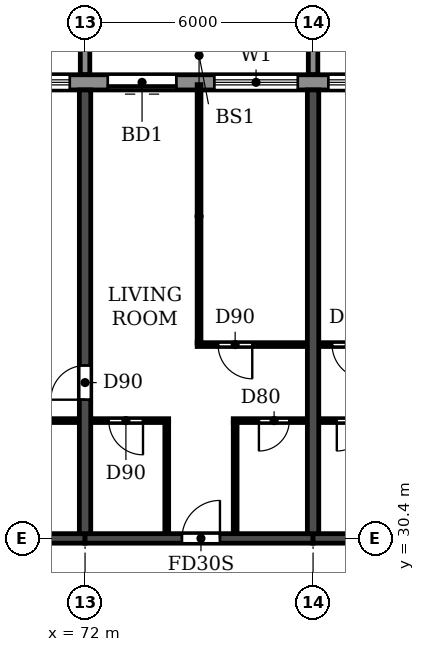
"""IFC4 building model, lengths in metres.
Left out: names, types, materials, properties, quantities, classifications, styles, units other than length and angle.
Written with IfcOpenShell. Run it as: python <this file> out.ifc"""

import sys

from ifc_helpers import new_model, si_unit, direction, frame, frame_2d, origin, place, context, subcontext, project, spatial, polyline, rectangle, outline, extrude, source, transform, mapped, element, fill, save


model = new_model("IFC4")
c1 = context("Model", 3, precision=1e-05, world=origin(), true_north=direction((0.0, 1.0)))
c2 = subcontext(c1, "Body", "Model", "MODEL_VIEW")
j1 = project(units=[si_unit("LENGTHUNIT", "METRE"), si_unit("PLANEANGLEUNIT", "RADIAN")], contexts=[c1])
p1 = place(None, origin())
s1 = spatial("IfcSite", under=j1, at=p1, CompositionType="ELEMENT")
p2 = place(p1, origin())
s2 = spatial("IfcBuilding", under=s1, at=p2, CompositionType="ELEMENT")
p3 = place(p2, frame((0.0, 0.0, 155.4)))
s3 = spatial("IfcBuildingStorey", under=s2, at=p3, CompositionType="ELEMENT", Elevation=155.4)
p4 = place(p3, frame((72.0, 30.525, 0.0), z_axis=(0.0, 0.0, 1.0), x_axis=(0.0, 1.0, 0.0)))
e1 = element("IfcWall", 1, at=p4, inside=s3, PredefinedType="SHEAR", context=c2, shape_type="SweptSolid", body=[
    extrude(rectangle(XDim=11.675, YDim=0.3, at=frame_2d((5.837, 0.0))), origin(), (0.0, 0.0, 1.0), 3.0),
])
p5 = place(p4, frame((3.525, 0.0, 0.0)))
e2 = element("IfcOpeningElement", 2, at=p5, cuts=e1, PredefinedType="OPENING", context=c2, shape_type="SweptSolid", body=[
    extrude(rectangle(XDim=0.9, YDim=2.1, at=frame_2d((0.45, 1.05))), frame((0.0, 0.16, 0.0), z_axis=(0.0, -1.0, 0.0), x_axis=(1.0, 0.0, 0.0)), (0.0, 0.0, 1.0), 0.32),
])
p6 = place(p3, frame((78.0, 30.525, 0.0), z_axis=(0.0, 0.0, 1.0), x_axis=(0.0, 1.0, 0.0)))
e3 = element("IfcWall", 3, at=p6, inside=s3, PredefinedType="SHEAR", context=c2, shape_type="SweptSolid", body=[
    extrude(rectangle(XDim=11.675, YDim=0.3, at=frame_2d((5.837, 0.0))), origin(), (0.0, 0.0, 1.0), 3.0),
])
p7 = place(p3, frame((66.0, 30.4, 0.0), z_axis=(0.0, 0.0, 1.0), x_axis=(1.0, 0.0, 0.0)))
e4 = element("IfcWall", 4, at=p7, inside=s3, PredefinedType="SHEAR", context=c2, shape_type="SweptSolid", body=[
    extrude(rectangle(XDim=6.0, YDim=0.25, at=frame_2d((3.0, 0.0))), origin(), (0.0, 0.0, 1.0), 2.4),
])
p8 = place(p3, frame((72.0, 30.4, 0.0), z_axis=(0.0, 0.0, 1.0), x_axis=(1.0, 0.0, 0.0)))
e5 = element("IfcWall", 5, at=p8, inside=s3, PredefinedType="SHEAR", context=c2, shape_type="SweptSolid", body=[
    extrude(rectangle(XDim=6.0, YDim=0.25, at=frame_2d((3.0, 0.0))), origin(), (0.0, 0.0, 1.0), 2.4),
])
p9 = place(p8, frame((2.55, 0.0, 0.0)))
e6 = element("IfcOpeningElement", 6, at=p9, cuts=e5, PredefinedType="OPENING", context=c2, shape_type="SweptSolid", body=[
    extrude(rectangle(XDim=1.0, YDim=2.1, at=frame_2d((0.5, 1.05))), frame((0.0, 0.135, 0.0), z_axis=(0.0, -1.0, 0.0), x_axis=(1.0, 0.0, 0.0)), (0.0, 0.0, 1.0), 0.27),
])
p10 = place(p3, frame((78.0, 30.4, 0.0), z_axis=(0.0, 0.0, 1.0), x_axis=(1.0, 0.0, 0.0)))
e7 = element("IfcWall", 7, at=p10, inside=s3, PredefinedType="SHEAR", context=c2, shape_type="SweptSolid", body=[
    extrude(rectangle(XDim=6.0, YDim=0.25, at=frame_2d((3.0, 0.0))), origin(), (0.0, 0.0, 1.0), 2.4),
])
p11 = place(p10, frame((2.45, 0.0, 0.0)))
e8 = element("IfcOpeningElement", 8, at=p11, cuts=e7, PredefinedType="OPENING", context=c2, shape_type="SweptSolid", body=[
    extrude(rectangle(XDim=1.0, YDim=2.1, at=frame_2d((0.5, 1.05))), frame((0.0, 0.135, 0.0), z_axis=(0.0, -1.0, 0.0), x_axis=(1.0, 0.0, 0.0)), (0.0, 0.0, 1.0), 0.27),
])
p12 = place(p3, frame((85.317, 42.4, 0.0), z_axis=(0.0, 0.0, 1.0), x_axis=(-1.0, 0.0, 0.0)))
e9 = element("IfcWall", 9, at=p12, inside=s3, PredefinedType="STANDARD", context=c2, shape_type="SweptSolid", body=[
    extrude(rectangle(XDim=68.634, YDim=0.4, at=frame_2d((34.317, 0.0))), origin(), (0.0, 0.0, 1.0), 3.0),
])
p13 = place(p12, frame((64.917, 0.0, 0.0)))
e10 = element("IfcOpeningElement", 10, at=p13, cuts=e9, PredefinedType="OPENING", context=c2, shape_type="SweptSolid", body=[
    extrude(rectangle(XDim=1.8, YDim=2.4, at=frame_2d((0.9, 1.2))), frame((0.0, 0.21, 0.0), z_axis=(0.0, -1.0, 0.0), x_axis=(1.0, 0.0, 0.0)), (0.0, 0.0, 1.0), 0.42),
])
p14 = place(p12, frame((61.717, 0.0, 0.9)))
e11 = element("IfcOpeningElement", 11, at=p14, cuts=e9, PredefinedType="OPENING", context=c2, shape_type="SweptSolid", body=[
    extrude(rectangle(XDim=2.2, YDim=1.5, at=frame_2d((1.1, 0.75))), frame((0.0, 0.21, 0.0), z_axis=(0.0, -1.0, 0.0), x_axis=(1.0, 0.0, 0.0)), (0.0, 0.0, 1.0), 0.42),
])
p15 = place(p12, frame((58.717, 0.0, 0.9)))
e12 = element("IfcOpeningElement", 12, at=p15, cuts=e9, PredefinedType="OPENING", context=c2, shape_type="SweptSolid", body=[
    extrude(rectangle(XDim=2.2, YDim=1.5, at=frame_2d((1.1, 0.75))), frame((0.0, 0.21, 0.0), z_axis=(0.0, -1.0, 0.0), x_axis=(1.0, 0.0, 0.0)), (0.0, 0.0, 1.0), 0.42),
])
p16 = place(p12, frame((55.917, 0.0, 0.0)))
e13 = element("IfcOpeningElement", 13, at=p16, cuts=e9, PredefinedType="OPENING", context=c2, shape_type="SweptSolid", body=[
    extrude(rectangle(XDim=1.8, YDim=2.4, at=frame_2d((0.9, 1.2))), frame((0.0, 0.21, 0.0), z_axis=(0.0, -1.0, 0.0), x_axis=(1.0, 0.0, 0.0)), (0.0, 0.0, 1.0), 0.42),
])
p17 = place(p12, frame((52.917, 0.0, 0.0)))
e14 = element("IfcOpeningElement", 14, at=p17, cuts=e9, PredefinedType="OPENING", context=c2, shape_type="SweptSolid", body=[
    extrude(rectangle(XDim=1.8, YDim=2.4, at=frame_2d((0.9, 1.2))), frame((0.0, 0.21, 0.0), z_axis=(0.0, -1.0, 0.0), x_axis=(1.0, 0.0, 0.0)), (0.0, 0.0, 1.0), 0.42),
])
p18 = place(p12, frame((49.717, 0.0, 0.9)))
e15 = element("IfcOpeningElement", 15, at=p18, cuts=e9, PredefinedType="OPENING", context=c2, shape_type="SweptSolid", body=[
    extrude(rectangle(XDim=2.2, YDim=1.5, at=frame_2d((1.1, 0.75))), frame((0.0, 0.21, 0.0), z_axis=(0.0, -1.0, 0.0), x_axis=(1.0, 0.0, 0.0)), (0.0, 0.0, 1.0), 0.42),
])
p19 = place(p12, frame((46.717, 0.0, 0.9)))
e16 = element("IfcOpeningElement", 16, at=p19, cuts=e9, PredefinedType="OPENING", context=c2, shape_type="SweptSolid", body=[
    extrude(rectangle(XDim=2.2, YDim=1.5, at=frame_2d((1.1, 0.75))), frame((0.0, 0.21, 0.0), z_axis=(0.0, -1.0, 0.0), x_axis=(1.0, 0.0, 0.0)), (0.0, 0.0, 1.0), 0.42),
])
p20 = place(p12, frame((43.717, 0.0, 0.9)))
e17 = element("IfcOpeningElement", 17, at=p20, cuts=e9, PredefinedType="OPENING", context=c2, shape_type="SweptSolid", body=[
    extrude(rectangle(XDim=2.2, YDim=1.5, at=frame_2d((1.1, 0.75))), frame((0.0, 0.21, 0.0), z_axis=(0.0, -1.0, 0.0), x_axis=(1.0, 0.0, 0.0)), (0.0, 0.0, 1.0), 0.42),
])
p21 = place(p12, frame((40.917, 0.0, 0.0)))
e18 = element("IfcOpeningElement", 18, at=p21, cuts=e9, PredefinedType="OPENING", context=c2, shape_type="SweptSolid", body=[
    extrude(rectangle(XDim=1.8, YDim=2.4, at=frame_2d((0.9, 1.2))), frame((0.0, 0.21, 0.0), z_axis=(0.0, -1.0, 0.0), x_axis=(1.0, 0.0, 0.0)), (0.0, 0.0, 1.0), 0.42),
])
p22 = place(p12, frame((37.717, 0.0, 0.9)))
e19 = element("IfcOpeningElement", 19, at=p22, cuts=e9, PredefinedType="OPENING", context=c2, shape_type="SweptSolid", body=[
    extrude(rectangle(XDim=2.2, YDim=1.5, at=frame_2d((1.1, 0.75))), frame((0.0, 0.21, 0.0), z_axis=(0.0, -1.0, 0.0), x_axis=(1.0, 0.0, 0.0)), (0.0, 0.0, 1.0), 0.42),
])
p23 = place(p12, frame((34.917, 0.0, 0.0)))
e20 = element("IfcOpeningElement", 20, at=p23, cuts=e9, PredefinedType="OPENING", context=c2, shape_type="SweptSolid", body=[
    extrude(rectangle(XDim=1.8, YDim=2.4, at=frame_2d((0.9, 1.2))), frame((0.0, 0.21, 0.0), z_axis=(0.0, -1.0, 0.0), x_axis=(1.0, 0.0, 0.0)), (0.0, 0.0, 1.0), 0.42),
])
p24 = place(p12, frame((31.717, 0.0, 0.9)))
e21 = element("IfcOpeningElement", 21, at=p24, cuts=e9, PredefinedType="OPENING", context=c2, shape_type="SweptSolid", body=[
    extrude(rectangle(XDim=2.2, YDim=1.5, at=frame_2d((1.1, 0.75))), frame((0.0, 0.21, 0.0), z_axis=(0.0, -1.0, 0.0), x_axis=(1.0, 0.0, 0.0)), (0.0, 0.0, 1.0), 0.42),
])
p25 = place(p12, frame((28.717, 0.0, 0.9)))
e22 = element("IfcOpeningElement", 22, at=p25, cuts=e9, PredefinedType="OPENING", context=c2, shape_type="SweptSolid", body=[
    extrude(rectangle(XDim=2.2, YDim=1.5, at=frame_2d((1.1, 0.75))), frame((0.0, 0.21, 0.0), z_axis=(0.0, -1.0, 0.0), x_axis=(1.0, 0.0, 0.0)), (0.0, 0.0, 1.0), 0.42),
])
p26 = place(p12, frame((25.717, 0.0, 0.9)))
e23 = element("IfcOpeningElement", 23, at=p26, cuts=e9, PredefinedType="OPENING", context=c2, shape_type="SweptSolid", body=[
    extrude(rectangle(XDim=2.2, YDim=1.5, at=frame_2d((1.1, 0.75))), frame((0.0, 0.21, 0.0), z_axis=(0.0, -1.0, 0.0), x_axis=(1.0, 0.0, 0.0)), (0.0, 0.0, 1.0), 0.42),
])
p27 = place(p12, frame((22.717, 0.0, 0.9)))
e24 = element("IfcOpeningElement", 24, at=p27, cuts=e9, PredefinedType="OPENING", context=c2, shape_type="SweptSolid", body=[
    extrude(rectangle(XDim=2.2, YDim=1.5, at=frame_2d((1.1, 0.75))), frame((0.0, 0.21, 0.0), z_axis=(0.0, -1.0, 0.0), x_axis=(1.0, 0.0, 0.0)), (0.0, 0.0, 1.0), 0.42),
])
p28 = place(p12, frame((19.917, 0.0, 0.0)))
e25 = element("IfcOpeningElement", 25, at=p28, cuts=e9, PredefinedType="OPENING", context=c2, shape_type="SweptSolid", body=[
    extrude(rectangle(XDim=1.8, YDim=2.4, at=frame_2d((0.9, 1.2))), frame((0.0, 0.21, 0.0), z_axis=(0.0, -1.0, 0.0), x_axis=(1.0, 0.0, 0.0)), (0.0, 0.0, 1.0), 0.42),
])
p29 = place(p12, frame((16.717, 0.0, 0.9)))
e26 = element("IfcOpeningElement", 26, at=p29, cuts=e9, PredefinedType="OPENING", context=c2, shape_type="SweptSolid", body=[
    extrude(rectangle(XDim=2.2, YDim=1.5, at=frame_2d((1.1, 0.75))), frame((0.0, 0.21, 0.0), z_axis=(0.0, -1.0, 0.0), x_axis=(1.0, 0.0, 0.0)), (0.0, 0.0, 1.0), 0.42),
])
p30 = place(p12, frame((13.717, 0.0, 0.9)))
e27 = element("IfcOpeningElement", 27, at=p30, cuts=e9, PredefinedType="OPENING", context=c2, shape_type="SweptSolid", body=[
    extrude(rectangle(XDim=2.2, YDim=1.5, at=frame_2d((1.1, 0.75))), frame((0.0, 0.21, 0.0), z_axis=(0.0, -1.0, 0.0), x_axis=(1.0, 0.0, 0.0)), (0.0, 0.0, 1.0), 0.42),
])
p31 = place(p12, frame((10.917, 0.0, 0.0)))
e28 = element("IfcOpeningElement", 28, at=p31, cuts=e9, PredefinedType="OPENING", context=c2, shape_type="SweptSolid", body=[
    extrude(rectangle(XDim=1.8, YDim=2.4, at=frame_2d((0.9, 1.2))), frame((0.0, 0.21, 0.0), z_axis=(0.0, -1.0, 0.0), x_axis=(1.0, 0.0, 0.0)), (0.0, 0.0, 1.0), 0.42),
])
p32 = place(p12, frame((7.717, 0.0, 0.9)))
e29 = element("IfcOpeningElement", 29, at=p32, cuts=e9, PredefinedType="OPENING", context=c2, shape_type="SweptSolid", body=[
    extrude(rectangle(XDim=2.2, YDim=1.5, at=frame_2d((1.1, 0.75))), frame((0.0, 0.21, 0.0), z_axis=(0.0, -1.0, 0.0), x_axis=(1.0, 0.0, 0.0)), (0.0, 0.0, 1.0), 0.42),
])
p33 = place(p12, frame((4.717, 0.0, 0.9)))
e30 = element("IfcOpeningElement", 30, at=p33, cuts=e9, PredefinedType="OPENING", context=c2, shape_type="SweptSolid", body=[
    extrude(rectangle(XDim=2.2, YDim=1.5, at=frame_2d((1.1, 0.75))), frame((0.0, 0.21, 0.0), z_axis=(0.0, -1.0, 0.0), x_axis=(1.0, 0.0, 0.0)), (0.0, 0.0, 1.0), 0.42),
])
p34 = place(p12, frame((1.917, 0.0, 0.0)))
e31 = element("IfcOpeningElement", 31, at=p34, cuts=e9, PredefinedType="OPENING", context=c2, shape_type="SweptSolid", body=[
    extrude(rectangle(XDim=1.8, YDim=2.4, at=frame_2d((0.9, 1.2))), frame((0.0, 0.21, 0.0), z_axis=(0.0, -1.0, 0.0), x_axis=(1.0, 0.0, 0.0)), (0.0, 0.0, 1.0), 0.42),
])
m1 = source(origin(), c2, "Body", "SweptSolid", [
    extrude(outline(polyline([(0.0, 0.0), (0.25, 0.0), (0.25, 3.1), (0.0, 3.1), (0.0, 0.0)])), origin(), (0.0, 0.0, 1.0), 3.1),
])
for number, where in (
    (32, (71.875, 42.6, 0.0)),
    (33, (77.875, 42.6, 0.0)),
):
    element("IfcWall", number, at=place(p3, frame(where)), inside=s3, PredefinedType="STANDARD", context=c2, shape_type="MappedRepresentation", body=[
        mapped(m1, transform((0.0, 0.0, 0.0))),
    ])
p35 = place(p3, frame((68.9, 33.5, 0.0), z_axis=(0.0, 0.0, 1.0), x_axis=(1.0, 0.0, 0.0)))
e34 = element("IfcWall", 34, at=p35, inside=s3, PredefinedType="PARTITIONING", context=c2, shape_type="SweptSolid", body=[
    extrude(rectangle(XDim=2.94, YDim=0.1, at=frame_2d((1.47, 0.0))), origin(), (0.0, 0.0, 1.0), 3.0),
])
p36 = place(p35, frame((1.2, 0.0, 0.0)))
e35 = element("IfcOpeningElement", 35, at=p36, cuts=e34, PredefinedType="OPENING", context=c2, shape_type="SweptSolid", body=[
    extrude(rectangle(XDim=0.8, YDim=2.1, at=frame_2d((0.4, 1.05))), frame((0.0, 0.06, 0.0), z_axis=(0.0, -1.0, 0.0), x_axis=(1.0, 0.0, 0.0)), (0.0, 0.0, 1.0), 0.12),
])
p37 = place(p3, frame((72.16, 33.5, 0.0), z_axis=(0.0, 0.0, 1.0), x_axis=(1.0, 0.0, 0.0)))
e36 = element("IfcWall", 36, at=p37, inside=s3, PredefinedType="PARTITIONING", context=c2, shape_type="SweptSolid", body=[
    extrude(rectangle(XDim=2.04, YDim=0.1, at=frame_2d((1.02, 0.0))), origin(), (0.0, 0.0, 1.0), 3.0),
])
p38 = place(p37, frame((0.465, 0.0, 0.0)))
e37 = element("IfcOpeningElement", 37, at=p38, cuts=e36, PredefinedType="OPENING", context=c2, shape_type="SweptSolid", body=[
    extrude(rectangle(XDim=0.9, YDim=2.1, at=frame_2d((0.45, 1.05))), frame((0.0, 0.06, 0.0), z_axis=(0.0, -1.0, 0.0), x_axis=(1.0, 0.0, 0.0)), (0.0, 0.0, 1.0), 0.12),
])
p39 = place(p3, frame((75.9, 33.5, 0.0), z_axis=(0.0, 0.0, 1.0), x_axis=(1.0, 0.0, 0.0)))
e38 = element("IfcWall", 38, at=p39, inside=s3, PredefinedType="PARTITIONING", context=c2, shape_type="SweptSolid", body=[
    extrude(rectangle(XDim=1.94, YDim=0.1, at=frame_2d((0.97, 0.0))), origin(), (0.0, 0.0, 1.0), 3.0),
])
p40 = place(p39, frame((0.675, 0.0, 0.0)))
e39 = element("IfcOpeningElement", 39, at=p40, cuts=e38, PredefinedType="OPENING", context=c2, shape_type="SweptSolid", body=[
    extrude(rectangle(XDim=0.8, YDim=2.1, at=frame_2d((0.4, 1.05))), frame((0.0, 0.06, 0.0), z_axis=(0.0, -1.0, 0.0), x_axis=(1.0, 0.0, 0.0)), (0.0, 0.0, 1.0), 0.12),
])
p41 = place(p3, frame((78.16, 33.5, 0.0), z_axis=(0.0, 0.0, 1.0), x_axis=(1.0, 0.0, 0.0)))
e40 = element("IfcWall", 40, at=p41, inside=s3, PredefinedType="PARTITIONING", context=c2, shape_type="SweptSolid", body=[
    extrude(rectangle(XDim=1.94, YDim=0.1, at=frame_2d((0.97, 0.0))), origin(), (0.0, 0.0, 1.0), 3.0),
])
p42 = place(p41, frame((0.465, 0.0, 0.0)))
e41 = element("IfcOpeningElement", 41, at=p42, cuts=e40, PredefinedType="OPENING", context=c2, shape_type="SweptSolid", body=[
    extrude(rectangle(XDim=0.8, YDim=2.1, at=frame_2d((0.4, 1.05))), frame((0.0, 0.06, 0.0), z_axis=(0.0, -1.0, 0.0), x_axis=(1.0, 0.0, 0.0)), (0.0, 0.0, 1.0), 0.12),
])
p43 = place(p3, frame((74.95, 35.5, 0.0), z_axis=(0.0, 0.0, 1.0), x_axis=(1.0, 0.0, 0.0)))
e42 = element("IfcWall", 42, at=p43, inside=s3, PredefinedType="PARTITIONING", context=c2, shape_type="SweptSolid", body=[
    extrude(rectangle(XDim=2.89, YDim=0.1, at=frame_2d((1.445, 0.0))), origin(), (0.0, 0.0, 1.0), 3.0),
])
p44 = place(p43, frame((0.55, 0.0, 0.0)))
e43 = element("IfcOpeningElement", 43, at=p44, cuts=e42, PredefinedType="OPENING", context=c2, shape_type="SweptSolid", body=[
    extrude(rectangle(XDim=0.9, YDim=2.1, at=frame_2d((0.45, 1.05))), frame((0.0, 0.06, 0.0), z_axis=(0.0, -1.0, 0.0), x_axis=(1.0, 0.0, 0.0)), (0.0, 0.0, 1.0), 0.12),
])
p45 = place(p3, frame((78.16, 35.5, 0.0), z_axis=(0.0, 0.0, 1.0), x_axis=(1.0, 0.0, 0.0)))
e44 = element("IfcWall", 44, at=p45, inside=s3, PredefinedType="PARTITIONING", context=c2, shape_type="SweptSolid", body=[
    extrude(rectangle(XDim=2.89, YDim=0.1, at=frame_2d((1.445, 0.0))), origin(), (0.0, 0.0, 1.0), 3.0),
])
p46 = place(p45, frame((0.34, 0.0, 0.0)))
e45 = element("IfcOpeningElement", 45, at=p46, cuts=e44, PredefinedType="OPENING", context=c2, shape_type="SweptSolid", body=[
    extrude(rectangle(XDim=0.9, YDim=2.1, at=frame_2d((0.45, 1.05))), frame((0.0, 0.06, 0.0), z_axis=(0.0, -1.0, 0.0), x_axis=(1.0, 0.0, 0.0)), (0.0, 0.0, 1.0), 0.12),
])
p47 = place(p3, frame((74.15, 30.535, 0.0), z_axis=(0.0, 0.0, 1.0), x_axis=(0.0, 1.0, 0.0)))
e46 = element("IfcWall", 46, at=p47, inside=s3, PredefinedType="PARTITIONING", context=c2, shape_type="SweptSolid", body=[
    extrude(rectangle(XDim=2.915, YDim=0.1, at=frame_2d((1.458, 0.0))), origin(), (0.0, 0.0, 1.0), 3.0),
])
p48 = place(p3, frame((75.0, 35.55, 0.0), z_axis=(0.0, 0.0, 1.0), x_axis=(0.0, 1.0, 0.0)))
e47 = element("IfcWall", 47, at=p48, inside=s3, PredefinedType="PARTITIONING", context=c2, shape_type="SweptSolid", body=[
    extrude(rectangle(XDim=6.79, YDim=0.1, at=frame_2d((3.395, 0.0))), origin(), (0.0, 0.0, 1.0), 3.0),
])
p49 = place(p3, frame((75.95, 30.535, 0.0), z_axis=(0.0, 0.0, 1.0), x_axis=(0.0, 1.0, 0.0)))
e48 = element("IfcWall", 48, at=p49, inside=s3, PredefinedType="PARTITIONING", context=c2, shape_type="SweptSolid", body=[
    extrude(rectangle(XDim=2.915, YDim=0.1, at=frame_2d((1.458, 0.0))), origin(), (0.0, 0.0, 1.0), 3.0),
])
p50 = place(p30, origin())
e49 = element("IfcWindow", 49, at=p50, inside=s3, PartitioningType="DOUBLE_PANEL_HORIZONTAL", PredefinedType="WINDOW", context=c2, shape_type="SweptSolid", body=[
    extrude(rectangle(XDim=2.2, YDim=1.5, at=frame_2d((1.1, 0.75))), frame((0.0, 0.03, 0.0), z_axis=(0.0, -1.0, 0.0), x_axis=(1.0, 0.0, 0.0)), (0.0, 0.0, 1.0), 0.06),
])
fill(e27, e49)
p51 = place(p31, origin())
e50 = element("IfcDoor", 50, at=p51, inside=s3, OperationType="DOUBLE_DOOR_SLIDING", PredefinedType="DOOR", context=c2, shape_type="SweptSolid", body=[
    extrude(rectangle(XDim=1.8, YDim=2.4, at=frame_2d((0.9, 1.2))), frame((0.0, 0.025, 0.0), z_axis=(0.0, -1.0, 0.0), x_axis=(1.0, 0.0, 0.0)), (0.0, 0.0, 1.0), 0.05),
])
fill(e28, e50)
p52 = place(p32, origin())
e51 = element("IfcWindow", 51, at=p52, inside=s3, PartitioningType="DOUBLE_PANEL_HORIZONTAL", PredefinedType="WINDOW", context=c2, shape_type="SweptSolid", body=[
    extrude(rectangle(XDim=2.2, YDim=1.5, at=frame_2d((1.1, 0.75))), frame((0.0, 0.03, 0.0), z_axis=(0.0, -1.0, 0.0), x_axis=(1.0, 0.0, 0.0)), (0.0, 0.0, 1.0), 0.06),
])
fill(e29, e51)
p53 = place(p33, origin())
e52 = element("IfcWindow", 52, at=p53, inside=s3, PartitioningType="DOUBLE_PANEL_HORIZONTAL", PredefinedType="WINDOW", context=c2, shape_type="SweptSolid", body=[
    extrude(rectangle(XDim=2.2, YDim=1.5, at=frame_2d((1.1, 0.75))), frame((0.0, 0.03, 0.0), z_axis=(0.0, -1.0, 0.0), x_axis=(1.0, 0.0, 0.0)), (0.0, 0.0, 1.0), 0.06),
])
fill(e30, e52)
p54 = place(p5, origin())
e53 = element("IfcDoor", 53, at=p54, inside=s3, OperationType="SINGLE_SWING_LEFT", PredefinedType="DOOR", context=c2, shape_type="SweptSolid", body=[
    extrude(rectangle(XDim=0.9, YDim=2.1, at=frame_2d((0.45, 1.05))), frame((0.0, 0.025, 0.0), z_axis=(0.0, -1.0, 0.0), x_axis=(1.0, 0.0, 0.0)), (0.0, 0.0, 1.0), 0.05),
])
fill(e2, e53)
p55 = place(p38, frame((0.9, 0.0, 0.0), z_axis=(0.0, 0.0, 1.0), x_axis=(-1.0, 0.0, 0.0)))
e54 = element("IfcDoor", 54, at=p55, inside=s3, OperationType="SINGLE_SWING_LEFT", PredefinedType="DOOR", context=c2, shape_type="SweptSolid", body=[
    extrude(rectangle(XDim=0.9, YDim=2.1, at=frame_2d((0.45, 1.05))), frame((0.0, 0.025, 0.0), z_axis=(0.0, -1.0, 0.0), x_axis=(1.0, 0.0, 0.0)), (0.0, 0.0, 1.0), 0.05),
])
fill(e37, e54)
p56 = place(p9, origin())
e55 = element("IfcDoor", 55, at=p56, inside=s3, OperationType="SINGLE_SWING_RIGHT", PredefinedType="DOOR", context=c2, shape_type="SweptSolid", body=[
    extrude(rectangle(XDim=1.0, YDim=2.1, at=frame_2d((0.5, 1.05))), frame((0.0, 0.025, 0.0), z_axis=(0.0, -1.0, 0.0), x_axis=(1.0, 0.0, 0.0)), (0.0, 0.0, 1.0), 0.05),
])
fill(e6, e55)
p57 = place(p44, frame((0.9, 0.0, 0.0), z_axis=(0.0, 0.0, 1.0), x_axis=(-1.0, 0.0, 0.0)))
e56 = element("IfcDoor", 56, at=p57, inside=s3, OperationType="SINGLE_SWING_LEFT", PredefinedType="DOOR", context=c2, shape_type="SweptSolid", body=[
    extrude(rectangle(XDim=0.9, YDim=2.1, at=frame_2d((0.45, 1.05))), frame((0.0, 0.025, 0.0), z_axis=(0.0, -1.0, 0.0), x_axis=(1.0, 0.0, 0.0)), (0.0, 0.0, 1.0), 0.05),
])
fill(e43, e56)
p58 = place(p40, frame((0.8, 0.0, 0.0), z_axis=(0.0, 0.0, 1.0), x_axis=(-1.0, 0.0, 0.0)))
e57 = element("IfcDoor", 57, at=p58, inside=s3, OperationType="SINGLE_SWING_RIGHT", PredefinedType="DOOR", context=c2, shape_type="SweptSolid", body=[
    extrude(rectangle(XDim=0.8, YDim=2.1, at=frame_2d((0.4, 1.05))), frame((0.0, 0.025, 0.0), z_axis=(0.0, -1.0, 0.0), x_axis=(1.0, 0.0, 0.0)), (0.0, 0.0, 1.0), 0.05),
])
fill(e39, e57)
p59 = place(p46, frame((0.9, 0.0, 0.0), z_axis=(0.0, 0.0, 1.0), x_axis=(-1.0, 0.0, 0.0)))
e58 = element("IfcDoor", 58, at=p59, inside=s3, OperationType="SINGLE_SWING_LEFT", PredefinedType="DOOR", context=c2, shape_type="SweptSolid", body=[
    extrude(rectangle(XDim=0.9, YDim=2.1, at=frame_2d((0.45, 1.05))), frame((0.0, 0.025, 0.0), z_axis=(0.0, -1.0, 0.0), x_axis=(1.0, 0.0, 0.0)), (0.0, 0.0, 1.0), 0.05),
])
fill(e45, e58)
p60 = place(p42, frame((0.8, 0.0, 0.0), z_axis=(0.0, 0.0, 1.0), x_axis=(-1.0, 0.0, 0.0)))
e59 = element("IfcDoor", 59, at=p60, inside=s3, OperationType="SINGLE_SWING_RIGHT", PredefinedType="DOOR", context=c2, shape_type="SweptSolid", body=[
    extrude(rectangle(XDim=0.8, YDim=2.1, at=frame_2d((0.4, 1.05))), frame((0.0, 0.025, 0.0), z_axis=(0.0, -1.0, 0.0), x_axis=(1.0, 0.0, 0.0)), (0.0, 0.0, 1.0), 0.05),
])
fill(e41, e59)
save(model, sys.argv[1])
